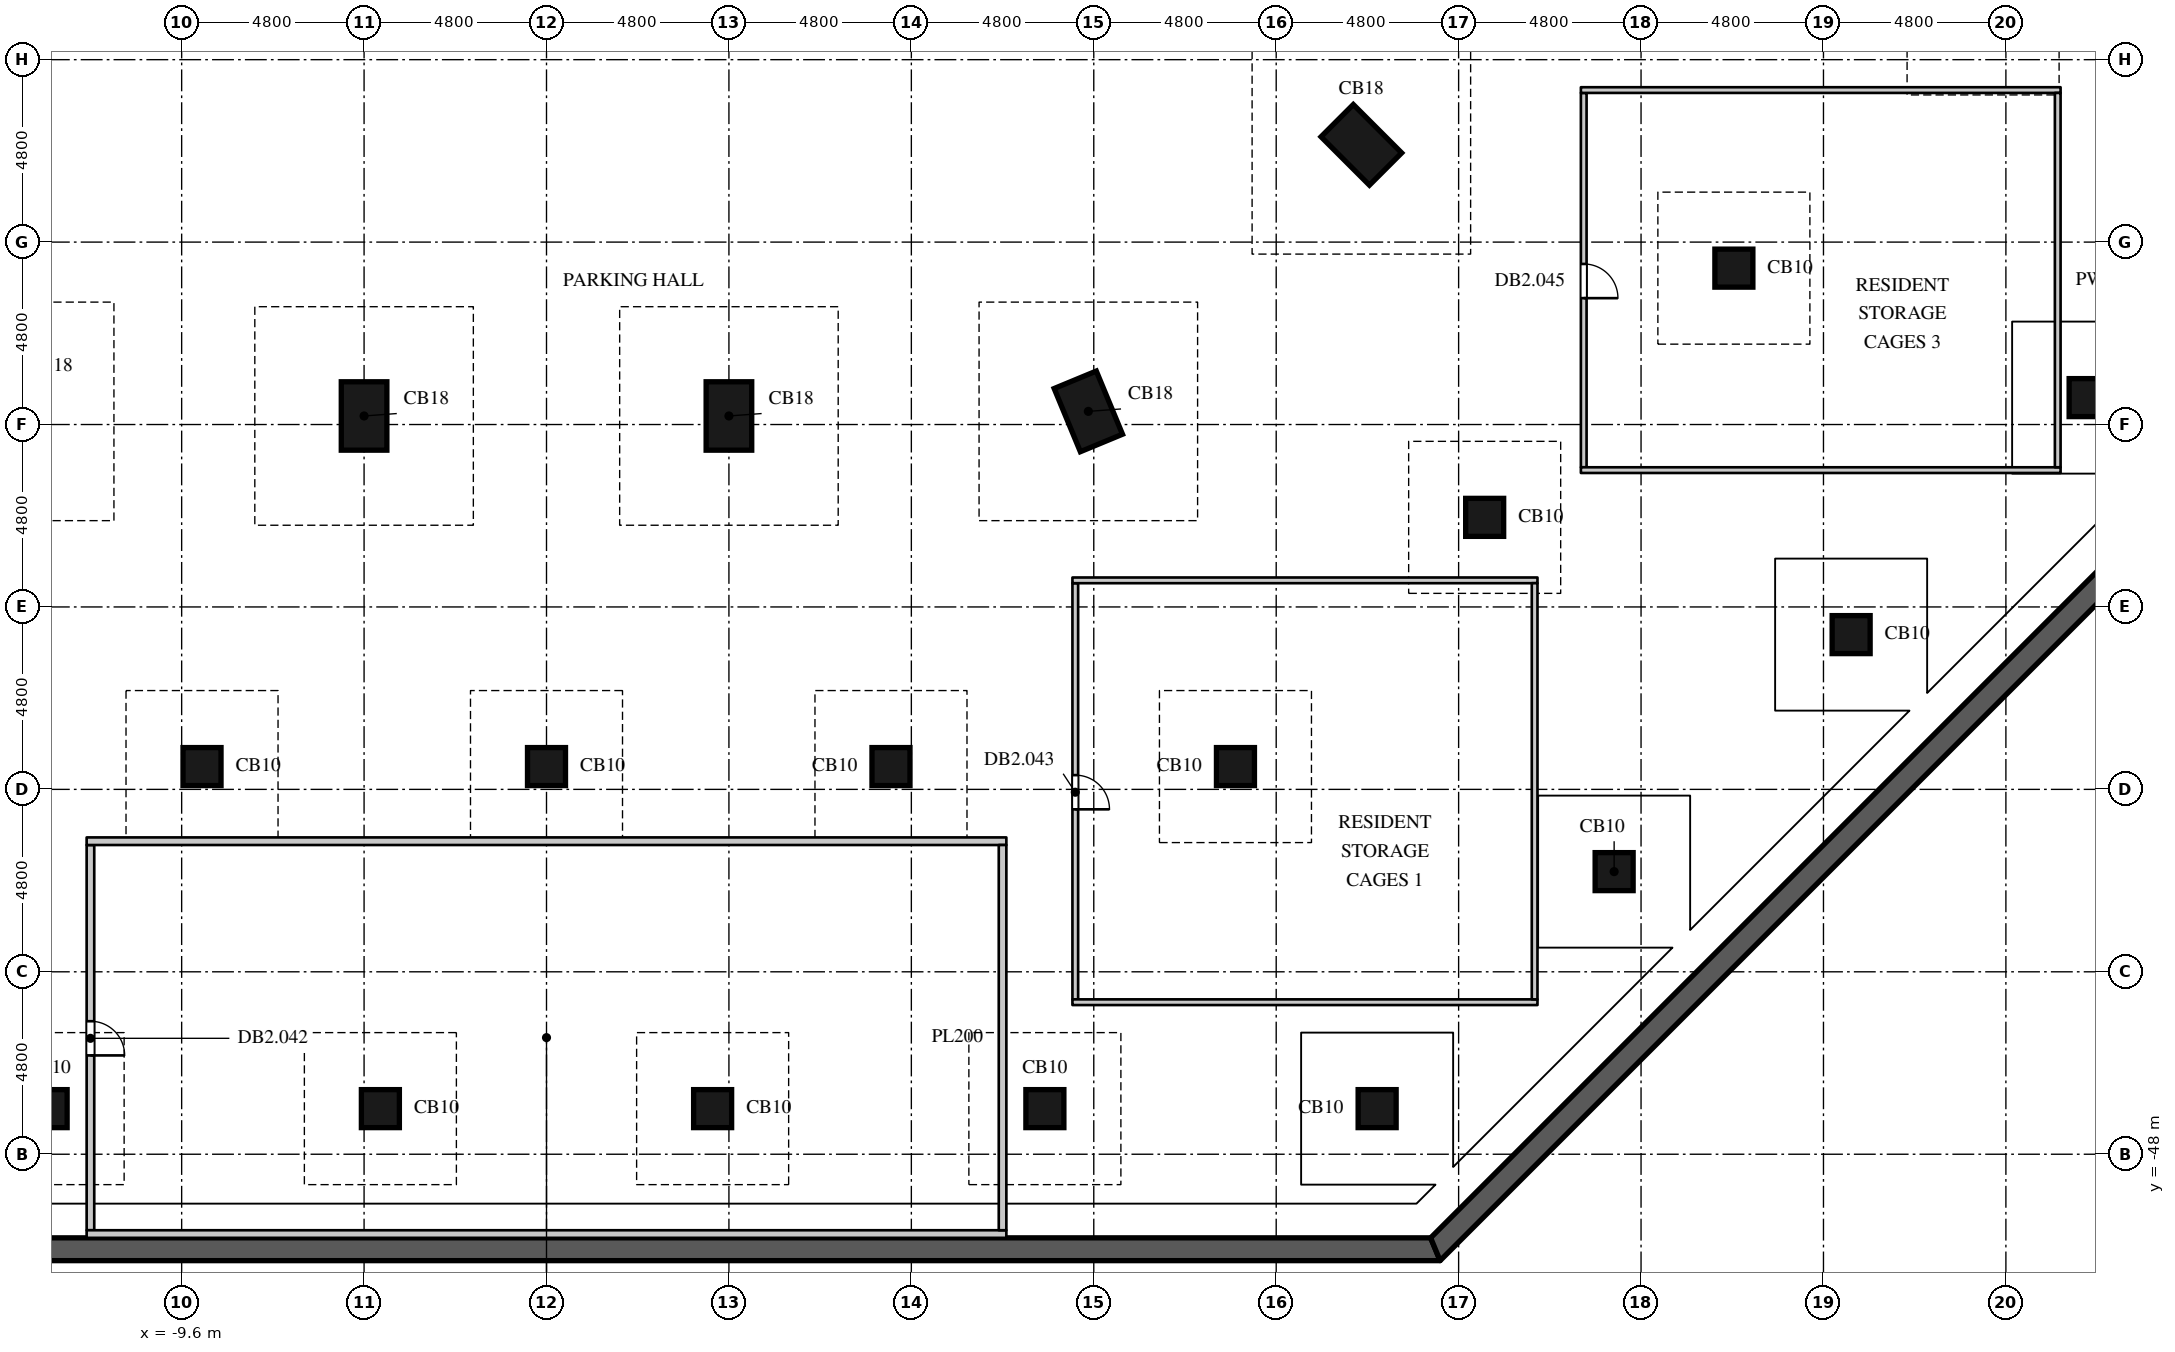
"""IFC4 building model, lengths in metres.
Left out: names, types, materials, properties, quantities, classifications, styles, units other than length and angle.
Written with IfcOpenShell. Run it as: python <this file> out.ifc"""

import sys

from ifc_helpers import new_model, si_unit, direction, frame, frame_2d, origin, origin_2d, place, context, subcontext, project, spatial, polyline, rectangle, outline, extrude, element, fill, save


model = new_model("IFC4")
c1 = context("Model", 3, precision=1e-05, world=origin(), true_north=direction((0.0, 1.0)))
c2 = subcontext(c1, "Body", "Model", "MODEL_VIEW")
j1 = project(units=[si_unit("LENGTHUNIT", "METRE"), si_unit("PLANEANGLEUNIT", "RADIAN")], contexts=[c1])
p1 = place(None, origin())
s1 = spatial("IfcSite", under=j1, at=p1, CompositionType="ELEMENT")
p2 = place(p1, origin())
s2 = spatial("IfcBuilding", under=s1, at=p2, CompositionType="ELEMENT")
p3 = place(p2, frame((0.0, 0.0, -9.0)))
s3 = spatial("IfcBuildingStorey", under=s2, at=p3, CompositionType="ELEMENT", Elevation=-9.0)
p4 = place(p3, origin())
e1 = element("IfcWall", 1, at=p4, inside=s3, PredefinedType="SOLIDWALL", context=c2, shape_type="SweptSolid", body=[
    extrude(outline(polyline([(-23.513, -50.8), (23.513, -50.8), (23.264, -50.2), (-23.264, -50.2), (-23.513, -50.8)])), origin(), (0.0, 0.0, 1.0), 4.5),
])
p5 = place(p3, origin())
e2 = element("IfcWall", 2, at=p5, inside=s3, PredefinedType="SOLIDWALL", context=c2, shape_type="SweptSolid", body=[
    extrude(outline(polyline([(23.513, -50.8), (50.8, -23.513), (50.2, -23.264), (23.264, -50.2), (23.513, -50.8)])), origin(), (0.0, 0.0, 1.0), 4.5),
])
for number, where, z_axis, x_axis in (
    (3, (-13.114, -46.8, 0.0), (0.0, 0.0, 1.0), (1.0, 0.0, 0.0)),
    (4, (-4.371, -46.8, 0.0), (0.0, 0.0, 1.0), (1.0, 0.0, 0.0)),
    (5, (4.371, -46.8, 0.0), (0.0, 0.0, 1.0), (1.0, 0.0, 0.0)),
    (6, (13.114, -46.8, 0.0), (0.0, 0.0, 1.0), (1.0, 0.0, 0.0)),
    (7, (21.856, -46.8, 0.0), (0.0, 0.0, 1.0), (1.0, 0.0, 0.0)),
    (8, (28.092, -40.564, 0.0), (0.0, 0.0, 1.0), (1.0, 0.0, 0.0)),
    (9, (-9.064, -37.8, 0.0), (0.0, 0.0, 1.0), (1.0, 0.0, 0.0)),
    (10, (0.0, -37.8, 0.0), (0.0, 0.0, 1.0), (1.0, 0.0, 0.0)),
    (11, (9.064, -37.8, 0.0), (0.0, 0.0, 1.0), (1.0, 0.0, 0.0)),
    (12, (18.128, -37.8, 0.0), (0.0, 0.0, 1.0), (1.0, 0.0, 0.0)),
    (13, (34.328, -34.328, 0.0), (0.0, 0.0, 1.0), (1.0, 0.0, 0.0)),
    (14, (24.685, -31.243, 0.0), (0.0, 0.0, 1.0), (1.0, 0.0, 0.0)),
):
    element("IfcColumn", number, at=place(p3, frame(where, z_axis=z_axis, x_axis=x_axis)), inside=s3, PredefinedType="COLUMN", context=c2, shape_type="SweptSolid", body=[
        extrude(rectangle(XDim=1.0, YDim=1.0, at=origin_2d()), origin(), (0.0, 0.0, 1.0), 4.5),
    ])
for number, where, z_axis, x_axis in (
    (15, (-4.8, -28.575, 0.0), (0.0, 0.0, 1.0), (1.0, 0.0, 0.0)),
    (16, (4.8, -28.575, 0.0), (0.0, 0.0, 1.0), (1.0, 0.0, 0.0)),
    (17, (14.257, -28.454, 0.0), (0.0, 0.0, 1.0), (0.924, 0.383, 0.0)),
):
    element("IfcColumn", number, at=place(p3, frame(where, z_axis=z_axis, x_axis=x_axis)), inside=s3, PredefinedType="COLUMN", context=c2, shape_type="SweptSolid", body=[
        extrude(rectangle(XDim=1.2, YDim=1.8, at=origin_2d()), origin(), (0.0, 0.0, 1.0), 4.5),
    ])
for number, where, z_axis, x_axis in (
    (18, (40.564, -28.092, 0.0), (0.0, 0.0, 1.0), (1.0, 0.0, 0.0)),
    (19, (31.243, -24.685, 0.0), (0.0, 0.0, 1.0), (1.0, 0.0, 0.0)),
):
    element("IfcColumn", number, at=place(p3, frame(where, z_axis=z_axis, x_axis=x_axis)), inside=s3, PredefinedType="COLUMN", context=c2, shape_type="SweptSolid", body=[
        extrude(rectangle(XDim=1.0, YDim=1.0, at=origin_2d()), origin(), (0.0, 0.0, 1.0), 4.5),
    ])
p6 = place(p3, frame((21.441, -21.441, 0.0), z_axis=(0.0, 0.0, 1.0), x_axis=(0.707106781187, 0.707106781187, 0.0)))
e20 = element("IfcColumn", 20, at=p6, inside=s3, PredefinedType="COLUMN", context=c2, shape_type="SweptSolid", body=[
    extrude(rectangle(XDim=1.2, YDim=1.8, at=origin_2d()), origin(), (0.0, 0.0, 1.0), 4.5),
])
p7 = place(p3, frame((13.914, -43.925, 0.0), z_axis=(0.0, 0.0, 1.0), x_axis=(0.0, 1.0, 0.0)))
e21 = element("IfcWall", 21, at=p7, inside=s3, PredefinedType="PARTITIONING", context=c2, shape_type="SweptSolid", body=[
    extrude(rectangle(XDim=10.95, YDim=0.15, at=frame_2d((5.475, 0.0))), origin(), (0.0, 0.0, 1.0), 4.048),
])
p8 = place(p7, frame((5.0, 0.0, 0.0)))
e22 = element("IfcOpeningElement", 22, at=p8, cuts=e21, PredefinedType="OPENING", context=c2, shape_type="SweptSolid", body=[
    extrude(rectangle(XDim=0.9, YDim=2.2, at=frame_2d((0.45, 1.1))), frame((0.0, 0.085, 0.0), z_axis=(0.0, -1.0, 0.0), x_axis=(1.0, 0.0, 0.0)), (0.0, 0.0, 1.0), 0.17),
])
for number, where, z_axis, x_axis in (
    (23, (13.839, -44.0, 0.0), (0.0, 0.0, 1.0), (1.0, 0.0, 0.0)),
    (24, (13.839, -32.9, 0.0), (0.0, 0.0, 1.0), (1.0, 0.0, 0.0)),
):
    element("IfcWall", number, at=place(p3, frame(where, z_axis=z_axis, x_axis=x_axis)), inside=s3, PredefinedType="PARTITIONING", context=c2, shape_type="SweptSolid", body=[
        extrude(rectangle(XDim=12.236, YDim=0.15, at=frame_2d((6.118, 0.0))), origin(), (0.0, 0.0, 1.0), 4.048),
    ])
p9 = place(p3, frame((26.0, -43.925, 0.0), z_axis=(0.0, 0.0, 1.0), x_axis=(0.0, 1.0, 0.0)))
e25 = element("IfcWall", 25, at=p9, inside=s3, PredefinedType="PARTITIONING", context=c2, shape_type="SweptSolid", body=[
    extrude(rectangle(XDim=10.95, YDim=0.15, at=frame_2d((5.475, 0.0))), origin(), (0.0, 0.0, 1.0), 4.048),
])
p10 = place(p3, frame((27.292, -29.925, 0.0), z_axis=(0.0, 0.0, 1.0), x_axis=(0.0, 1.0, 0.0)))
e26 = element("IfcWall", 26, at=p10, inside=s3, PredefinedType="PARTITIONING", context=c2, shape_type="SweptSolid", body=[
    extrude(rectangle(XDim=9.85, YDim=0.15, at=frame_2d((4.925, 0.0))), origin(), (0.0, 0.0, 1.0), 4.048),
])
p11 = place(p10, frame((4.45, 0.0, 0.0)))
e27 = element("IfcOpeningElement", 27, at=p11, cuts=e26, PredefinedType="OPENING", context=c2, shape_type="SweptSolid", body=[
    extrude(rectangle(XDim=0.9, YDim=2.2, at=frame_2d((0.45, 1.1))), frame((0.0, 0.085, 0.0), z_axis=(0.0, -1.0, 0.0), x_axis=(1.0, 0.0, 0.0)), (0.0, 0.0, 1.0), 0.17),
])
for number, where, z_axis, x_axis in (
    (28, (27.217, -30.0, 0.0), (0.0, 0.0, 1.0), (1.0, 0.0, 0.0)),
    (29, (27.217, -20.0, 0.0), (0.0, 0.0, 1.0), (1.0, 0.0, 0.0)),
):
    element("IfcWall", number, at=place(p3, frame(where, z_axis=z_axis, x_axis=x_axis)), inside=s3, PredefinedType="PARTITIONING", context=c2, shape_type="SweptSolid", body=[
        extrude(rectangle(XDim=12.622, YDim=0.15, at=frame_2d((6.311, 0.0))), origin(), (0.0, 0.0, 1.0), 4.048),
    ])
p12 = place(p3, frame((39.764, -29.925, 0.0), z_axis=(0.0, 0.0, 1.0), x_axis=(0.0, 1.0, 0.0)))
e30 = element("IfcWall", 30, at=p12, inside=s3, PredefinedType="PARTITIONING", context=c2, shape_type="SweptSolid", body=[
    extrude(rectangle(XDim=9.85, YDim=0.15, at=frame_2d((4.925, 0.0))), origin(), (0.0, 0.0, 1.0), 4.048),
])
p13 = place(p3, frame((-12.0, -50.0, 0.0), z_axis=(0.0, 0.0, 1.0), x_axis=(0.0, 1.0, 0.0)))
e31 = element("IfcWall", 31, at=p13, inside=s3, PredefinedType="PARTITIONING", context=c2, shape_type="SweptSolid", body=[
    extrude(rectangle(XDim=10.136, YDim=0.2, at=frame_2d((5.068, 0.0))), origin(), (0.0, 0.0, 1.0), 4.048),
])
p14 = place(p13, frame((4.6, 0.0, 0.0)))
e32 = element("IfcOpeningElement", 32, at=p14, cuts=e31, PredefinedType="OPENING", context=c2, shape_type="SweptSolid", body=[
    extrude(rectangle(XDim=0.9, YDim=2.2, at=frame_2d((0.45, 1.1))), frame((0.0, 0.11, 0.0), z_axis=(0.0, -1.0, 0.0), x_axis=(1.0, 0.0, 0.0)), (0.0, 0.0, 1.0), 0.22),
])
for number, where, z_axis, x_axis in (
    (33, (-12.1, -50.1, 0.0), (0.0, 0.0, 1.0), (1.0, 0.0, 0.0)),
    (34, (-12.1, -39.764, 0.0), (0.0, 0.0, 1.0), (1.0, 0.0, 0.0)),
):
    element("IfcWall", number, at=place(p3, frame(where, z_axis=z_axis, x_axis=x_axis)), inside=s3, PredefinedType="PARTITIONING", context=c2, shape_type="SweptSolid", body=[
        extrude(rectangle(XDim=24.2, YDim=0.2, at=frame_2d((12.1, 0.0))), origin(), (0.0, 0.0, 1.0), 4.048),
    ])
p15 = place(p3, frame((12.0, -50.0, 0.0), z_axis=(0.0, 0.0, 1.0), x_axis=(0.0, 1.0, 0.0)))
e35 = element("IfcWall", 35, at=p15, inside=s3, PredefinedType="PARTITIONING", context=c2, shape_type="SweptSolid", body=[
    extrude(rectangle(XDim=10.136, YDim=0.2, at=frame_2d((5.068, 0.0))), origin(), (0.0, 0.0, 1.0), 4.048),
])
p16 = place(p14, origin())
e36 = element("IfcDoor", 36, at=p16, inside=s3, OperationType="SINGLE_SWING_RIGHT", PredefinedType="DOOR", context=c2, shape_type="SweptSolid", body=[
    extrude(rectangle(XDim=0.9, YDim=2.2, at=frame_2d((0.45, 1.1))), frame((0.0, 0.025, 0.0), z_axis=(0.0, -1.0, 0.0), x_axis=(1.0, 0.0, 0.0)), (0.0, 0.0, 1.0), 0.05),
])
fill(e32, e36)
p17 = place(p8, origin())
e37 = element("IfcDoor", 37, at=p17, inside=s3, OperationType="SINGLE_SWING_RIGHT", PredefinedType="DOOR", context=c2, shape_type="SweptSolid", body=[
    extrude(rectangle(XDim=0.9, YDim=2.2, at=frame_2d((0.45, 1.1))), frame((0.0, 0.025, 0.0), z_axis=(0.0, -1.0, 0.0), x_axis=(1.0, 0.0, 0.0)), (0.0, 0.0, 1.0), 0.05),
])
fill(e22, e37)
p18 = place(p11, origin())
e38 = element("IfcDoor", 38, at=p18, inside=s3, OperationType="SINGLE_SWING_RIGHT", PredefinedType="DOOR", context=c2, shape_type="SweptSolid", body=[
    extrude(rectangle(XDim=0.9, YDim=2.2, at=frame_2d((0.45, 1.1))), frame((0.0, 0.025, 0.0), z_axis=(0.0, -1.0, 0.0), x_axis=(1.0, 0.0, 0.0)), (0.0, 0.0, 1.0), 0.05),
])
fill(e27, e38)
save(model, sys.argv[1])
